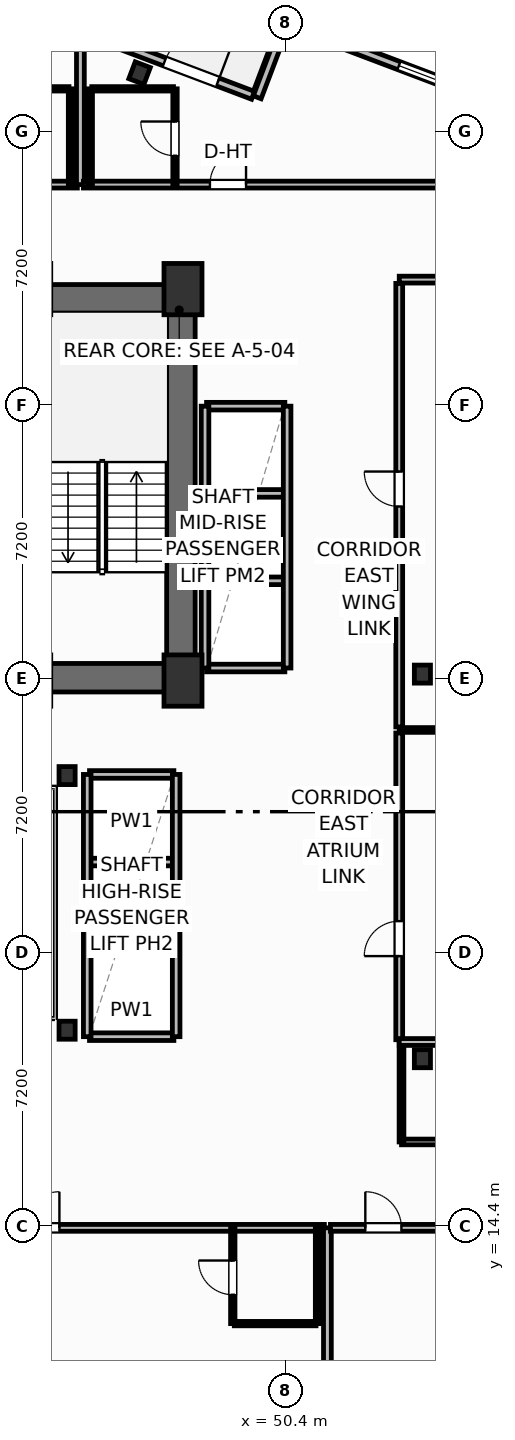
"""IFC4 building model, lengths in metres.
Left out: names, types, materials, properties, quantities, classifications, styles, units other than length and angle.
Written with IfcOpenShell. Run it as: python <this file> out.ifc"""

import sys

from ifc_helpers import new_model, si_unit, direction, frame, frame_2d, origin, origin_2d, place, context, subcontext, project, spatial, rectangle, i_section, extrude, element, fill, save


model = new_model("IFC4")
c1 = context("Model", 3, precision=1e-05, world=origin(), true_north=direction((0.0, 1.0)))
c2 = subcontext(c1, "Body", "Model", "MODEL_VIEW")
j1 = project(units=[si_unit("LENGTHUNIT", "METRE"), si_unit("PLANEANGLEUNIT", "RADIAN")], contexts=[c1])
p1 = place(None, origin())
s1 = spatial("IfcSite", under=j1, at=p1, CompositionType="ELEMENT")
p2 = place(p1, origin())
s2 = spatial("IfcBuilding", under=s1, at=p2, CompositionType="ELEMENT")
p3 = place(p2, frame((0.0, 0.0, 109.5)))
s3 = spatial("IfcBuildingStorey", under=s2, at=p3, CompositionType="ELEMENT", Elevation=109.5)
for number, where, z_axis, x_axis in (
    (1, (47.7, 28.75, 0.0), (0.0, 0.0, 1.0), (1.0, 0.0, 0.0)),
    (2, (47.7, 39.05, 0.0), (0.0, 0.0, 1.0), (1.0, 0.0, 0.0)),
):
    element("IfcColumn", number, at=place(p3, frame(where, z_axis=z_axis, x_axis=x_axis)), inside=s3, PredefinedType="COLUMN", context=c2, shape_type="SweptSolid", body=[
        extrude(rectangle(XDim=1.0, YDim=1.35, at=origin_2d()), origin(), (0.0, 0.0, 1.0), 3.7),
    ])
for number, where, z_axis, x_axis in (
    (3, (44.65, 19.55, 0.0), (0.0, 0.0, 1.0), (1.0, 0.0, 0.0)),
    (4, (44.65, 26.25, 0.0), (0.0, 0.0, 1.0), (1.0, 0.0, 0.0)),
    (5, (54.0, 18.8, 0.0), (0.0, 0.0, 1.0), (1.0, 0.0, 0.0)),
    (6, (54.0, 28.92, 0.0), (0.0, 0.0, 1.0), (1.0, 0.0, 0.0)),
):
    element("IfcColumn", number, at=place(p3, frame(where, z_axis=z_axis, x_axis=x_axis)), inside=s3, PredefinedType="COLUMN", context=c2, shape_type="SweptSolid", body=[
        extrude(i_section(OverallWidth=0.424, OverallDepth=0.474, WebThickness=0.048, FlangeThickness=0.077, FilletRadius=0.025, at=origin_2d()), origin(), (0.0, 0.0, 1.0), 3.7),
    ])
p4 = place(p3, frame((30.38, 38.795, 0.0), z_axis=(0.0, 0.0, 1.0), x_axis=(1.0, 0.0, 0.0)))
e7 = element("IfcWall", 7, at=p4, inside=s3, PredefinedType="SHEAR", context=c2, shape_type="SweptSolid", body=[
    extrude(rectangle(XDim=17.64, YDim=0.75, at=frame_2d((8.82, 0.0))), origin(), (0.0, 0.0, 1.0), 3.45),
])
p5 = place(p3, frame((47.645, 29.2, 0.0), z_axis=(0.0, 0.0, 1.0), x_axis=(0.0, 1.0, 0.0)))
e8 = element("IfcWall", 8, at=p5, inside=s3, PredefinedType="SHEAR", context=c2, shape_type="SweptSolid", body=[
    extrude(rectangle(XDim=9.22, YDim=0.75, at=frame_2d((4.61, 0.0))), origin(), (0.0, 0.0, 1.0), 3.45),
])
p6 = place(p3, frame((43.6, 28.825, 0.0), z_axis=(0.0, 0.0, 1.0), x_axis=(1.0, 0.0, 0.0)))
e9 = element("IfcWall", 9, at=p6, inside=s3, PredefinedType="SHEAR", context=c2, shape_type="SweptSolid", body=[
    extrude(rectangle(XDim=4.42, YDim=0.75, at=frame_2d((2.21, 0.0))), origin(), (0.0, 0.0, 1.0), 3.45),
])
p7 = place(p3, frame((46.557, 44.734, 0.0), z_axis=(0.0, 0.0, 1.0), x_axis=(0.935221751401, -0.354062530786, 0.0)))
e10 = element("IfcColumn", 10, at=p7, inside=s3, PredefinedType="COLUMN", context=c2, shape_type="SweptSolid", body=[
    extrude(i_section(OverallWidth=0.424, OverallDepth=0.474, WebThickness=0.048, FlangeThickness=0.077, FilletRadius=0.025, at=origin_2d()), origin(), (0.0, 0.0, 1.0), 3.7),
])
p8 = place(p3, frame((43.932, 46.273, 0.0), z_axis=(0.0, 0.0, 1.0), x_axis=(0.93521416643, -0.354082565101, 0.0)))
e11 = element("IfcWall", 11, at=p8, inside=s3, PredefinedType="SOLIDWALL", context=c2, shape_type="SweptSolid", body=[
    extrude(rectangle(XDim=6.0, YDim=0.22, at=frame_2d((3.0, 0.0))), origin(), (0.0, 0.0, 1.0), 2.73),
])
p9 = place(p8, frame((3.508, 0.0, 0.0)))
e12 = element("IfcOpeningElement", 12, at=p9, cuts=e11, PredefinedType="OPENING", context=c2, shape_type="SweptSolid", body=[
    extrude(rectangle(XDim=1.5, YDim=2.25, at=frame_2d((0.75, 1.125))), frame((0.0, 0.12, 0.0), z_axis=(0.0, -1.0, 0.0), x_axis=(1.0, 0.0, 0.0)), (0.0, 0.0, 1.0), 0.24),
])
p10 = place(p3, frame((57.91, 43.216, 0.0), z_axis=(0.0, 0.0, 1.0), x_axis=(-0.935220736163, 0.354065212427, 0.0)))
e13 = element("IfcWall", 13, at=p10, inside=s3, PredefinedType="SOLIDWALL", context=c2, shape_type="SweptSolid", body=[
    extrude(rectangle(XDim=8.035, YDim=0.22, at=frame_2d((4.018, 0.0))), origin(), (0.0, 0.0, 1.0), 2.73),
])
p11 = place(p10, frame((3.192, 0.0, 0.8)))
e14 = element("IfcOpeningElement", 14, at=p11, cuts=e13, PredefinedType="OPENING", context=c2, shape_type="SweptSolid", body=[
    extrude(rectangle(XDim=1.65, YDim=1.65, at=frame_2d((0.825, 0.825))), frame((0.0, 0.12, 0.0), z_axis=(0.0, -1.0, 0.0), x_axis=(1.0, 0.0, 0.0)), (0.0, 0.0, 1.0), 0.24),
])
p12 = place(p3, frame((50.352, 45.944, 0.0), z_axis=(0.0, 0.0, 1.0), x_axis=(-0.354061611705, -0.935222099352, 0.0)))
e15 = element("IfcWall", 15, at=p12, inside=s3, PredefinedType="SOLIDWALL", context=c2, shape_type="SweptSolid", body=[
    extrude(rectangle(XDim=1.975, YDim=0.22, at=frame_2d((0.987, 0.0))), origin(), (0.0, 0.0, 1.0), 2.73),
])
p13 = place(p3, frame((53.45, 16.61, 0.0), z_axis=(0.0, 0.0, 1.0), x_axis=(1.0, 0.0, 0.0)))
e16 = element("IfcWall", 16, at=p13, inside=s3, PredefinedType="PARTITIONING", context=c2, shape_type="SweptSolid", body=[
    extrude(rectangle(XDim=16.55, YDim=0.15, at=frame_2d((8.275, 0.0))), origin(), (0.0, 0.0, 1.0), 2.58),
])
p14 = place(p13, frame((6.548, 0.0, 0.0)))
e17 = element("IfcOpeningElement", 17, at=p14, cuts=e16, PredefinedType="OPENING", context=c2, shape_type="SweptSolid", body=[
    extrude(rectangle(XDim=0.92, YDim=2.05, at=frame_2d((0.46, 1.025))), frame((0.0, 0.085, 0.0), z_axis=(0.0, -1.0, 0.0), x_axis=(1.0, 0.0, 0.0)), (0.0, 0.0, 1.0), 0.17),
])
p15 = place(p3, frame((53.45, 16.61, 0.0), z_axis=(0.0, 0.0, 1.0), x_axis=(0.0, 1.0, 0.0)))
e18 = element("IfcWall", 18, at=p15, inside=s3, PredefinedType="PARTITIONING", context=c2, shape_type="SweptSolid", body=[
    extrude(rectangle(XDim=2.63, YDim=0.125, at=frame_2d((1.315, 0.0))), origin(), (0.0, 0.0, 1.0), 2.58),
])
p16 = place(p3, frame((42.58, 14.35, 0.0), z_axis=(0.0, 0.0, 1.0), x_axis=(1.0, 0.0, 0.0)))
e19 = element("IfcWall", 19, at=p16, inside=s3, PredefinedType="PARTITIONING", context=c2, shape_type="SweptSolid", body=[
    extrude(rectangle(XDim=8.84, YDim=0.18, at=frame_2d((4.42, 0.0))), origin(), (0.0, 0.0, 1.0), 3.45),
])
p17 = place(p16, frame((0.918, 0.0, 0.0)))
e20 = element("IfcOpeningElement", 20, at=p17, cuts=e19, PredefinedType="OPENING", context=c2, shape_type="SweptSolid", body=[
    extrude(rectangle(XDim=0.95, YDim=2.15, at=frame_2d((0.475, 1.075))), frame((0.0, 0.1, 0.0), z_axis=(0.0, -1.0, 0.0), x_axis=(1.0, 0.0, 0.0)), (0.0, 0.0, 1.0), 0.2),
])
p18 = place(p3, frame((49.05, 11.83, 0.0), z_axis=(0.0, 0.0, 1.0), x_axis=(1.0, 0.0, 0.0)))
e21 = element("IfcWall", 21, at=p18, inside=s3, PredefinedType="PARTITIONING", context=c2, shape_type="SweptSolid", body=[
    extrude(rectangle(XDim=2.15, YDim=0.115, at=frame_2d((1.075, 0.0))), origin(), (0.0, 0.0, 1.0), 3.45),
])
p19 = place(p3, frame((49.01, 11.83, 0.0), z_axis=(0.0, 0.0, 1.0), x_axis=(0.0, 1.0, 0.0)))
e22 = element("IfcWall", 22, at=p19, inside=s3, PredefinedType="PARTITIONING", context=c2, shape_type="SweptSolid", body=[
    extrude(rectangle(XDim=2.52, YDim=0.115, at=frame_2d((1.26, 0.0))), origin(), (0.0, 0.0, 1.0), 3.45),
])
p20 = place(p19, frame((0.76, 0.0, 0.0)))
e23 = element("IfcOpeningElement", 23, at=p20, cuts=e22, PredefinedType="OPENING", context=c2, shape_type="SweptSolid", body=[
    extrude(rectangle(XDim=0.9, YDim=2.05, at=frame_2d((0.45, 1.025))), frame((0.0, 0.067, 0.0), z_axis=(0.0, -1.0, 0.0), x_axis=(1.0, 0.0, 0.0)), (0.0, 0.0, 1.0), 0.135),
])
p21 = place(p3, frame((51.24, 11.83, 0.0), z_axis=(0.0, 0.0, 1.0), x_axis=(0.0, 1.0, 0.0)))
e24 = element("IfcWall", 24, at=p21, inside=s3, PredefinedType="PARTITIONING", context=c2, shape_type="SweptSolid", body=[
    extrude(rectangle(XDim=2.52, YDim=0.115, at=frame_2d((1.26, 0.0))), origin(), (0.0, 0.0, 1.0), 3.45),
])
p22 = place(p3, frame((51.5, -4.251, 0.0), z_axis=(0.0, 0.0, 1.0), x_axis=(0.0, 1.0, 0.0)))
e25 = element("IfcWall", 25, at=p22, inside=s3, PredefinedType="PARTITIONING", context=c2, shape_type="SweptSolid", body=[
    extrude(rectangle(XDim=18.601, YDim=0.205, at=frame_2d((9.301, 0.0))), origin(), (0.0, 0.0, 1.0), 2.58),
])
p23 = place(p3, frame((51.58, 14.35, 0.0), z_axis=(0.0, 0.0, 1.0), x_axis=(1.0, 0.0, 0.0)))
e26 = element("IfcWall", 26, at=p23, inside=s3, PredefinedType="PARTITIONING", context=c2, shape_type="SweptSolid", body=[
    extrude(rectangle(XDim=8.84, YDim=0.18, at=frame_2d((4.42, 0.0))), origin(), (0.0, 0.0, 1.0), 3.45),
])
p24 = place(p23, frame((0.918, 0.0, 0.0)))
e27 = element("IfcOpeningElement", 27, at=p24, cuts=e26, PredefinedType="OPENING", context=c2, shape_type="SweptSolid", body=[
    extrude(rectangle(XDim=0.95, YDim=2.15, at=frame_2d((0.475, 1.075))), frame((0.0, 0.1, 0.0), z_axis=(0.0, -1.0, 0.0), x_axis=(1.0, 0.0, 0.0)), (0.0, 0.0, 1.0), 0.2),
])
p25 = place(p3, frame((33.08, 41.8, 0.0), z_axis=(0.0, 0.0, 1.0), x_axis=(1.0, 0.0, 0.0)))
e28 = element("IfcWall", 28, at=p25, inside=s3, PredefinedType="PARTITIONING", context=c2, shape_type="SweptSolid", body=[
    extrude(rectangle(XDim=11.84, YDim=0.18, at=frame_2d((5.92, 0.0))), origin(), (0.0, 0.0, 1.0), 3.45),
])
p26 = place(p25, frame((0.936, 0.0, 0.0)))
e29 = element("IfcOpeningElement", 29, at=p26, cuts=e28, PredefinedType="OPENING", context=c2, shape_type="SweptSolid", body=[
    extrude(rectangle(XDim=0.95, YDim=2.15, at=frame_2d((0.475, 1.075))), frame((0.0, 0.1, 0.0), z_axis=(0.0, -1.0, 0.0), x_axis=(1.0, 0.0, 0.0)), (0.0, 0.0, 1.0), 0.2),
])
p27 = place(p3, frame((42.55, 44.32, 0.0), z_axis=(0.0, 0.0, 1.0), x_axis=(1.0, 0.0, 0.0)))
e30 = element("IfcWall", 30, at=p27, inside=s3, PredefinedType="PARTITIONING", context=c2, shape_type="SweptSolid", body=[
    extrude(rectangle(XDim=2.15, YDim=0.115, at=frame_2d((1.075, 0.0))), origin(), (0.0, 0.0, 1.0), 3.45),
])
p28 = place(p3, frame((44.74, 41.8, 0.0), z_axis=(0.0, 0.0, 1.0), x_axis=(0.0, 1.0, 0.0)))
e31 = element("IfcWall", 31, at=p28, inside=s3, PredefinedType="PARTITIONING", context=c2, shape_type="SweptSolid", body=[
    extrude(rectangle(XDim=2.52, YDim=0.115, at=frame_2d((1.26, 0.0))), origin(), (0.0, 0.0, 1.0), 3.45),
])
p29 = place(p3, frame((45.0, 41.8, 0.0), z_axis=(0.0, 0.0, 1.0), x_axis=(0.0, 1.0, 0.0)))
e32 = element("IfcWall", 32, at=p29, inside=s3, PredefinedType="PARTITIONING", context=c2, shape_type="SweptSolid", body=[
    extrude(rectangle(XDim=4.037, YDim=0.205, at=frame_2d((2.019, 0.0))), origin(), (0.0, 0.0, 1.0), 3.45),
])
p30 = place(p3, frame((45.08, 41.8, 0.0), z_axis=(0.0, 0.0, 1.0), x_axis=(1.0, 0.0, 0.0)))
e33 = element("IfcWall", 33, at=p30, inside=s3, PredefinedType="PARTITIONING", context=c2, shape_type="SweptSolid", body=[
    extrude(rectangle(XDim=12.406, YDim=0.18, at=frame_2d((6.203, 0.0))), origin(), (0.0, 0.0, 1.0), 3.45),
])
p31 = place(p30, frame((3.329, 0.0, 0.0)))
e34 = element("IfcOpeningElement", 34, at=p31, cuts=e33, PredefinedType="OPENING", context=c2, shape_type="SweptSolid", body=[
    extrude(rectangle(XDim=0.95, YDim=2.15, at=frame_2d((0.475, 1.075))), frame((0.0, 0.1, 0.0), z_axis=(0.0, -1.0, 0.0), x_axis=(1.0, 0.0, 0.0)), (0.0, 0.0, 1.0), 0.2),
])
p32 = place(p3, frame((45.3, 44.32, 0.0), z_axis=(0.0, 0.0, 1.0), x_axis=(1.0, 0.0, 0.0)))
e35 = element("IfcWall", 35, at=p32, inside=s3, PredefinedType="PARTITIONING", context=c2, shape_type="SweptSolid", body=[
    extrude(rectangle(XDim=2.15, YDim=0.115, at=frame_2d((1.075, 0.0))), origin(), (0.0, 0.0, 1.0), 3.45),
])
p33 = place(p3, frame((47.49, 41.8, 0.0), z_axis=(0.0, 0.0, 1.0), x_axis=(0.0, 1.0, 0.0)))
e36 = element("IfcWall", 36, at=p33, inside=s3, PredefinedType="PARTITIONING", context=c2, shape_type="SweptSolid", body=[
    extrude(rectangle(XDim=2.52, YDim=0.115, at=frame_2d((1.26, 0.0))), origin(), (0.0, 0.0, 1.0), 3.45),
])
p34 = place(p33, frame((0.76, 0.0, 0.0)))
e37 = element("IfcOpeningElement", 37, at=p34, cuts=e36, PredefinedType="OPENING", context=c2, shape_type="SweptSolid", body=[
    extrude(rectangle(XDim=0.9, YDim=2.05, at=frame_2d((0.45, 1.025))), frame((0.0, 0.067, 0.0), z_axis=(0.0, -1.0, 0.0), x_axis=(1.0, 0.0, 0.0)), (0.0, 0.0, 1.0), 0.135),
])
p35 = place(p3, frame((45.26, 41.8, 0.0), z_axis=(0.0, 0.0, 1.0), x_axis=(0.0, 1.0, 0.0)))
e38 = element("IfcWall", 38, at=p35, inside=s3, PredefinedType="PARTITIONING", context=c2, shape_type="SweptSolid", body=[
    extrude(rectangle(XDim=2.52, YDim=0.115, at=frame_2d((1.26, 0.0))), origin(), (0.0, 0.0, 1.0), 3.45),
])
p36 = place(p3, frame((53.39, 19.3, 0.0), z_axis=(0.0, 0.0, 1.0), x_axis=(0.0, 1.0, 0.0)))
e39 = element("IfcWall", 39, at=p36, inside=s3, PredefinedType="PARTITIONING", context=c2, shape_type="SweptSolid", body=[
    extrude(rectangle(XDim=8.07, YDim=0.18, at=frame_2d((4.035, 0.0))), origin(), (0.0, 0.0, 1.0), 3.45),
])
p37 = place(p36, frame((2.2, 0.0, 0.0)))
e40 = element("IfcOpeningElement", 40, at=p37, cuts=e39, PredefinedType="OPENING", context=c2, shape_type="SweptSolid", body=[
    extrude(rectangle(XDim=0.92, YDim=2.05, at=frame_2d((0.46, 1.025))), frame((0.0, 0.1, 0.0), z_axis=(0.0, -1.0, 0.0), x_axis=(1.0, 0.0, 0.0)), (0.0, 0.0, 1.0), 0.2),
])
p38 = place(p3, frame((53.39, 27.53, 0.0), z_axis=(0.0, 0.0, 1.0), x_axis=(0.0, 1.0, 0.0)))
e41 = element("IfcWall", 41, at=p38, inside=s3, PredefinedType="PARTITIONING", context=c2, shape_type="SweptSolid", body=[
    extrude(rectangle(XDim=11.67, YDim=0.18, at=frame_2d((5.835, 0.0))), origin(), (0.0, 0.0, 1.0), 3.45),
])
p39 = place(p38, frame((5.8, 0.0, 0.0)))
e42 = element("IfcOpeningElement", 42, at=p39, cuts=e41, PredefinedType="OPENING", context=c2, shape_type="SweptSolid", body=[
    extrude(rectangle(XDim=0.92, YDim=2.05, at=frame_2d((0.46, 1.025))), frame((0.0, 0.1, 0.0), z_axis=(0.0, -1.0, 0.0), x_axis=(1.0, 0.0, 0.0)), (0.0, 0.0, 1.0), 0.2),
])
p40 = place(p3, frame((53.39, 27.45, 0.0), z_axis=(0.0, 0.0, 1.0), x_axis=(1.0, 0.0, 0.0)))
e43 = element("IfcWall", 43, at=p40, inside=s3, PredefinedType="PARTITIONING", context=c2, shape_type="SweptSolid", body=[
    extrude(rectangle(XDim=23.61, YDim=0.125, at=frame_2d((11.805, 0.0))), origin(), (0.0, 0.0, 1.0), 3.45),
])
p41 = place(p3, frame((53.39, 19.24, 0.0), z_axis=(0.0, 0.0, 1.0), x_axis=(1.0, 0.0, 0.0)))
e44 = element("IfcWall", 44, at=p41, inside=s3, PredefinedType="PARTITIONING", context=c2, shape_type="SweptSolid", body=[
    extrude(rectangle(XDim=23.317, YDim=0.18, at=frame_2d((11.658, 0.0))), origin(), (0.0, 0.0, 1.0), 3.45),
])
p42 = place(p3, frame((53.39, 39.3, 0.0), z_axis=(0.0, 0.0, 1.0), x_axis=(1.0, 0.0, 0.0)))
e45 = element("IfcWall", 45, at=p42, inside=s3, PredefinedType="PARTITIONING", context=c2, shape_type="SweptSolid", body=[
    extrude(rectangle(XDim=8.876, YDim=0.18, at=frame_2d((4.438, 0.0))), origin(), (0.0, 0.0, 1.0), 3.45),
])
for number, where, z_axis, x_axis in (
    (46, (48.32, 31.375, 0.0), (0.0, 0.0, 1.0), (1.0, 0.0, 0.0)),
    (47, (48.32, 33.675, 0.0), (0.0, 0.0, 1.0), (1.0, 0.0, 0.0)),
):
    element("IfcWall", number, at=place(p3, frame(where, z_axis=z_axis, x_axis=x_axis)), inside=s3, PredefinedType="PARTITIONING", context=c2, shape_type="SweptSolid", body=[
        extrude(rectangle(XDim=2.06, YDim=0.2, at=frame_2d((1.03, 0.0))), origin(), (0.0, 0.0, 1.0), 3.45),
    ])
p43 = place(p3, frame((48.32, 29.08, 0.0), z_axis=(0.0, 0.0, 1.0), x_axis=(1.0, 0.0, 0.0)))
e48 = element("IfcWall", 48, at=p43, inside=s3, PredefinedType="PARTITIONING", context=c2, shape_type="SweptSolid", body=[
    extrude(rectangle(XDim=2.06, YDim=0.2, at=frame_2d((1.03, 0.0))), origin(), (0.0, 0.0, 1.0), 2.662),
])
p44 = place(p3, frame((48.32, 35.97, 0.0), z_axis=(0.0, 0.0, 1.0), x_axis=(1.0, 0.0, 0.0)))
e49 = element("IfcWall", 49, at=p44, inside=s3, PredefinedType="PARTITIONING", context=c2, shape_type="SweptSolid", body=[
    extrude(rectangle(XDim=2.06, YDim=0.2, at=frame_2d((1.03, 0.0))), origin(), (0.0, 0.0, 1.0), 3.45),
])
for number, where, z_axis, x_axis in (
    (50, (48.28, 29.08, 0.0), (0.0, 0.0, 1.0), (0.0, 1.0, 0.0)),
    (51, (50.44, 29.08, 0.0), (0.0, 0.0, 1.0), (0.0, 1.0, 0.0)),
):
    element("IfcWall", number, at=place(p3, frame(where, z_axis=z_axis, x_axis=x_axis)), inside=s3, PredefinedType="PARTITIONING", context=c2, shape_type="SweptSolid", body=[
        extrude(rectangle(XDim=6.89, YDim=0.2, at=frame_2d((3.445, 0.0))), origin(), (0.0, 0.0, 1.0), 3.45),
    ])
for number, where, z_axis, x_axis in (
    (52, (45.24, 21.675, 0.0), (0.0, 0.0, 1.0), (1.0, 0.0, 0.0)),
    (53, (45.24, 23.975, 0.0), (0.0, 0.0, 1.0), (1.0, 0.0, 0.0)),
):
    element("IfcWall", number, at=place(p3, frame(where, z_axis=z_axis, x_axis=x_axis)), inside=s3, PredefinedType="PARTITIONING", context=c2, shape_type="SweptSolid", body=[
        extrude(rectangle(XDim=2.22, YDim=0.2, at=frame_2d((1.11, 0.0))), origin(), (0.0, 0.0, 1.0), 3.45),
    ])
p45 = place(p3, frame((45.24, 19.38, 0.0), z_axis=(0.0, 0.0, 1.0), x_axis=(1.0, 0.0, 0.0)))
e54 = element("IfcWall", 54, at=p45, inside=s3, PredefinedType="PARTITIONING", context=c2, shape_type="SweptSolid", body=[
    extrude(rectangle(XDim=2.22, YDim=0.2, at=frame_2d((1.11, 0.0))), origin(), (0.0, 0.0, 1.0), 2.662),
])
p46 = place(p3, frame((45.24, 26.28, 0.0), z_axis=(0.0, 0.0, 1.0), x_axis=(1.0, 0.0, 0.0)))
e55 = element("IfcWall", 55, at=p46, inside=s3, PredefinedType="PARTITIONING", context=c2, shape_type="SweptSolid", body=[
    extrude(rectangle(XDim=2.22, YDim=0.2, at=frame_2d((1.11, 0.0))), origin(), (0.0, 0.0, 1.0), 3.45),
])
for number, where, z_axis, x_axis in (
    (56, (45.18, 19.38, 0.0), (0.0, 0.0, 1.0), (0.0, 1.0, 0.0)),
    (57, (47.52, 19.38, 0.0), (0.0, 0.0, 1.0), (0.0, 1.0, 0.0)),
):
    element("IfcWall", number, at=place(p3, frame(where, z_axis=z_axis, x_axis=x_axis)), inside=s3, PredefinedType="PARTITIONING", context=c2, shape_type="SweptSolid", body=[
        extrude(rectangle(XDim=6.9, YDim=0.2, at=frame_2d((3.45, 0.0))), origin(), (0.0, 0.0, 1.0), 3.45),
    ])
p47 = place(p9, origin())
e58 = element("IfcDoor", 58, at=p47, inside=s3, OperationType="SINGLE_SWING_RIGHT", PredefinedType="DOOR", context=c2, shape_type="SweptSolid", body=[
    extrude(rectangle(XDim=1.5, YDim=2.25, at=frame_2d((0.75, 1.125))), frame((0.0, 0.025, 0.0), z_axis=(0.0, -1.0, 0.0), x_axis=(1.0, 0.0, 0.0)), (0.0, 0.0, 1.0), 0.05),
])
fill(e12, e58)
p48 = place(p11, origin())
e59 = element("IfcWindow", 59, at=p48, inside=s3, PartitioningType="SINGLE_PANEL", PredefinedType="WINDOW", context=c2, shape_type="SweptSolid", body=[
    extrude(rectangle(XDim=1.65, YDim=1.65, at=frame_2d((0.825, 0.825))), frame((0.0, 0.03, 0.0), z_axis=(0.0, -1.0, 0.0), x_axis=(1.0, 0.0, 0.0)), (0.0, 0.0, 1.0), 0.06),
])
fill(e14, e59)
p49 = place(p17, origin())
e60 = element("IfcDoor", 60, at=p49, inside=s3, OperationType="SINGLE_SWING_RIGHT", PredefinedType="DOOR", context=c2, shape_type="SweptSolid", body=[
    extrude(rectangle(XDim=0.95, YDim=2.15, at=frame_2d((0.475, 1.075))), frame((0.0, 0.025, 0.0), z_axis=(0.0, -1.0, 0.0), x_axis=(1.0, 0.0, 0.0)), (0.0, 0.0, 1.0), 0.05),
])
fill(e20, e60)
p50 = place(p20, origin())
e61 = element("IfcDoor", 61, at=p50, inside=s3, OperationType="SINGLE_SWING_RIGHT", PredefinedType="DOOR", context=c2, shape_type="SweptSolid", body=[
    extrude(rectangle(XDim=0.9, YDim=2.05, at=frame_2d((0.45, 1.025))), frame((0.0, 0.025, 0.0), z_axis=(0.0, -1.0, 0.0), x_axis=(1.0, 0.0, 0.0)), (0.0, 0.0, 1.0), 0.05),
])
fill(e23, e61)
p51 = place(p24, origin())
e62 = element("IfcDoor", 62, at=p51, inside=s3, OperationType="SINGLE_SWING_LEFT", PredefinedType="DOOR", context=c2, shape_type="SweptSolid", body=[
    extrude(rectangle(XDim=0.95, YDim=2.15, at=frame_2d((0.475, 1.075))), frame((0.0, 0.025, 0.0), z_axis=(0.0, -1.0, 0.0), x_axis=(1.0, 0.0, 0.0)), (0.0, 0.0, 1.0), 0.05),
])
fill(e27, e62)
p52 = place(p31, origin())
e63 = element("IfcDoor", 63, at=p52, inside=s3, OperationType="SINGLE_SWING_RIGHT", PredefinedType="DOOR", context=c2, shape_type="SweptSolid", body=[
    extrude(rectangle(XDim=0.95, YDim=2.15, at=frame_2d((0.475, 1.075))), frame((0.0, 0.025, 0.0), z_axis=(0.0, -1.0, 0.0), x_axis=(1.0, 0.0, 0.0)), (0.0, 0.0, 1.0), 0.05),
])
fill(e34, e63)
p53 = place(p34, origin())
e64 = element("IfcDoor", 64, at=p53, inside=s3, OperationType="SINGLE_SWING_RIGHT", PredefinedType="DOOR", context=c2, shape_type="SweptSolid", body=[
    extrude(rectangle(XDim=0.9, YDim=2.05, at=frame_2d((0.45, 1.025))), frame((0.0, 0.025, 0.0), z_axis=(0.0, -1.0, 0.0), x_axis=(1.0, 0.0, 0.0)), (0.0, 0.0, 1.0), 0.05),
])
fill(e37, e64)
p54 = place(p37, origin())
e65 = element("IfcDoor", 65, at=p54, inside=s3, OperationType="SINGLE_SWING_LEFT", PredefinedType="DOOR", context=c2, shape_type="SweptSolid", body=[
    extrude(rectangle(XDim=0.92, YDim=2.05, at=frame_2d((0.46, 1.025))), frame((0.0, 0.025, 0.0), z_axis=(0.0, -1.0, 0.0), x_axis=(1.0, 0.0, 0.0)), (0.0, 0.0, 1.0), 0.05),
])
fill(e40, e65)
p55 = place(p39, origin())
e66 = element("IfcDoor", 66, at=p55, inside=s3, OperationType="SINGLE_SWING_RIGHT", PredefinedType="DOOR", context=c2, shape_type="SweptSolid", body=[
    extrude(rectangle(XDim=0.92, YDim=2.05, at=frame_2d((0.46, 1.025))), frame((0.0, 0.025, 0.0), z_axis=(0.0, -1.0, 0.0), x_axis=(1.0, 0.0, 0.0)), (0.0, 0.0, 1.0), 0.05),
])
fill(e42, e66)
save(model, sys.argv[1])
